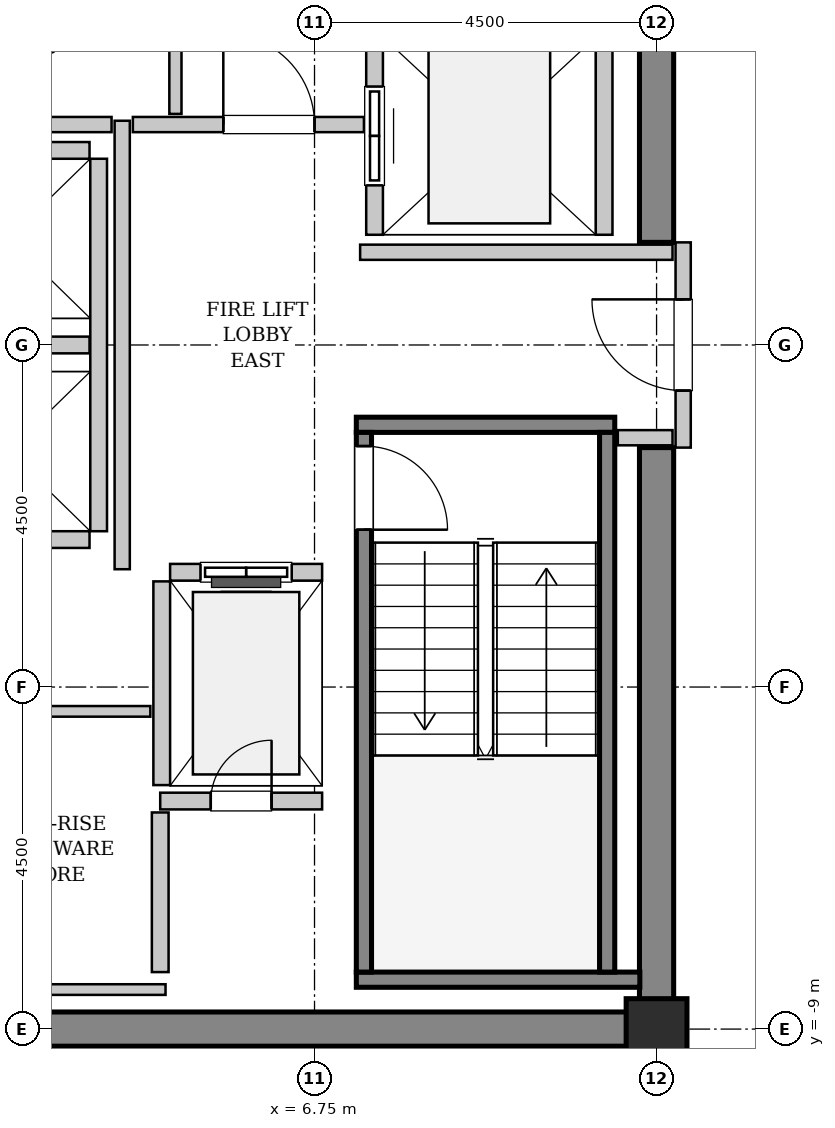
"""IFC4 building model, lengths in metres.
Left out: names, types, materials, properties, quantities, classifications, styles, units other than length and angle.
Written with IfcOpenShell. Run it as: python <this file> out.ifc"""

import sys

from ifc_helpers import new_model, si_unit, direction, frame, frame_2d, origin, origin_2d, place, context, subcontext, project, spatial, rectangle, hollow_rectangle, extrude, source, transform, mapped, element, fill, save


model = new_model("IFC4")
c1 = context("Model", 3, precision=1e-05, world=origin(), true_north=direction((0.0, 1.0)))
c2 = subcontext(c1, "Body", "Model", "MODEL_VIEW")
j1 = project(units=[si_unit("LENGTHUNIT", "METRE"), si_unit("PLANEANGLEUNIT", "RADIAN")], contexts=[c1])
p1 = place(None, origin())
s1 = spatial("IfcSite", under=j1, at=p1, CompositionType="ELEMENT")
p2 = place(p1, origin())
s2 = spatial("IfcBuilding", under=s1, at=p2, CompositionType="ELEMENT")
p3 = place(p2, frame((0.0, 0.0, 298.8)))
s3 = spatial("IfcBuildingStorey", under=s2, at=p3, CompositionType="ELEMENT", Elevation=298.8)
m1 = source(origin(), c2, "Body", "SweptSolid", [
    extrude(rectangle(XDim=9.925, YDim=0.45, at=frame_2d((4.962, 0.0))), origin(), (0.0, 0.0, 1.0), 3.8),
])
p4 = place(p3, frame((1.55, -9.0, 0.0), z_axis=(0.0, 0.0, 1.0), x_axis=(1.0, 0.0, 0.0)))
e1 = element("IfcWall", 1, at=p4, inside=s3, PredefinedType="SHEAR", context=c2, shape_type="MappedRepresentation", body=[
    mapped(m1, transform((0.0, 0.0, 0.0), x_axis=(1.0, 0.0, 0.0), y_axis=(0.0, 1.0, 0.0), z_axis=(0.0, 0.0, 1.0), scale=1.0)),
])
m2 = source(origin(), c2, "Body", "SweptSolid", [
    extrude(rectangle(XDim=7.425, YDim=0.45, at=frame_2d((3.712, 0.0))), origin(), (0.0, 0.0, 1.0), 3.8),
])
for number, where, z_axis, x_axis in (
    (2, (11.25, -8.775, 0.0), (0.0, 0.0, 1.0), (0.0, 1.0, 0.0)),
    (3, (11.25, 1.35, 0.0), (0.0, 0.0, 1.0), (0.0, 1.0, 0.0)),
):
    element("IfcWall", number, at=place(p3, frame(where, z_axis=z_axis, x_axis=x_axis)), inside=s3, PredefinedType="SHEAR", context=c2, shape_type="MappedRepresentation", body=[
        mapped(m2, transform((0.0, 0.0, 0.0), x_axis=(1.0, 0.0, 0.0), y_axis=(0.0, 1.0, 0.0), z_axis=(0.0, 0.0, 1.0), scale=1.0)),
    ])
m3 = source(origin(), c2, "Body", "SweptSolid", [
    extrude(hollow_rectangle(XDim=0.8, YDim=0.8, WallThickness=0.04, InnerFilletRadius=0.04, OuterFilletRadius=0.08, at=origin_2d()), origin(), (0.0, 0.0, 1.0), 3.8),
])
p5 = place(p3, frame((11.25, -9.0, 0.0), z_axis=(0.0, 0.0, 1.0), x_axis=(1.0, 0.0, 0.0)))
e4 = element("IfcColumn", 4, at=p5, inside=s3, PredefinedType="COLUMN", context=c2, shape_type="MappedRepresentation", body=[
    mapped(m3, transform((0.0, 0.0, 0.0), x_axis=(1.0, 0.0, 0.0), y_axis=(0.0, 1.0, 0.0), z_axis=(0.0, 0.0, 1.0), scale=1.0)),
])
m4 = source(origin(), c2, "Body", "SweptSolid", [
    extrude(rectangle(XDim=3.4, YDim=0.2, at=frame_2d((1.7, 0.0))), origin(), (0.0, 0.0, 1.0), 3.8),
])
p6 = place(p3, frame((7.3, -1.05, 0.0), z_axis=(0.0, 0.0, 1.0), x_axis=(1.0, 0.0, 0.0)))
e5 = element("IfcWall", 5, at=p6, inside=s3, PredefinedType="SOLIDWALL", context=c2, shape_type="MappedRepresentation", body=[
    mapped(m4, transform((0.0, 0.0, 0.0), x_axis=(1.0, 0.0, 0.0), y_axis=(0.0, 1.0, 0.0), z_axis=(0.0, 0.0, 1.0), scale=1.0)),
])
m5 = source(origin(), c2, "Body", "SweptSolid", [
    extrude(rectangle(XDim=3.73, YDim=0.2, at=frame_2d((1.865, 0.0))), origin(), (0.0, 0.0, 1.0), 3.8),
])
p7 = place(p3, frame((7.3, -8.35, 0.0), z_axis=(0.0, 0.0, 1.0), x_axis=(1.0, 0.0, 0.0)))
e6 = element("IfcWall", 6, at=p7, inside=s3, PredefinedType="SOLIDWALL", context=c2, shape_type="MappedRepresentation", body=[
    mapped(m5, transform((0.0, 0.0, 0.0), x_axis=(1.0, 0.0, 0.0), y_axis=(0.0, 1.0, 0.0), z_axis=(0.0, 0.0, 1.0), scale=1.0)),
])
m6 = source(origin(), c2, "Body", "SweptSolid", [
    extrude(rectangle(XDim=7.1, YDim=0.2, at=frame_2d((3.55, 0.0))), origin(), (0.0, 0.0, 1.0), 3.8),
])
p8 = place(p3, frame((7.4, -1.15, 0.0), z_axis=(0.0, 0.0, 1.0), x_axis=(0.0, -1.0, 0.0)))
e7 = element("IfcWall", 7, at=p8, inside=s3, PredefinedType="SOLIDWALL", context=c2, shape_type="MappedRepresentation", body=[
    mapped(m6, transform((0.0, 0.0, 0.0), x_axis=(1.0, 0.0, 0.0), y_axis=(0.0, 1.0, 0.0), z_axis=(0.0, 0.0, 1.0), scale=1.0)),
])
p9 = place(p8, frame((0.18, 0.0, 0.0)))
e8 = element("IfcOpeningElement", 8, at=p9, cuts=e7, PredefinedType="OPENING", context=c2, shape_type="SweptSolid", body=[
    extrude(rectangle(XDim=1.1, YDim=2.15, at=frame_2d((0.55, 1.075))), frame((0.0, 0.11, 0.0), z_axis=(0.0, -1.0, 0.0), x_axis=(1.0, 0.0, 0.0)), (0.0, 0.0, 1.0), 0.22),
])
p10 = place(p3, frame((10.6, -1.15, 0.0), z_axis=(0.0, 0.0, 1.0), x_axis=(0.0, -1.0, 0.0)))
e9 = element("IfcWall", 9, at=p10, inside=s3, PredefinedType="SOLIDWALL", context=c2, shape_type="MappedRepresentation", body=[
    mapped(m6, transform((0.0, 0.0, 0.0), x_axis=(1.0, 0.0, 0.0), y_axis=(0.0, 1.0, 0.0), z_axis=(0.0, 0.0, 1.0), scale=1.0)),
])
m7 = source(origin(), c2, "Body", "SweptSolid", [
    extrude(rectangle(XDim=2.0, YDim=0.22, at=frame_2d((1.0, 0.0))), origin(), (0.0, 0.0, 1.0), 3.535),
])
p11 = place(p3, frame((6.85, -2.99, 0.0), z_axis=(0.0, 0.0, 1.0), x_axis=(-1.0, 0.0, 0.0)))
e10 = element("IfcWall", 10, at=p11, inside=s3, PredefinedType="SOLIDWALL", context=c2, shape_type="MappedRepresentation", body=[
    mapped(m7, transform((0.0, 0.0, 0.0), x_axis=(1.0, 0.0, 0.0), y_axis=(0.0, 1.0, 0.0), z_axis=(0.0, 0.0, 1.0), scale=1.0)),
])
p12 = place(p11, frame((0.4, 0.0, 0.0)))
e11 = element("IfcOpeningElement", 11, at=p12, cuts=e10, PredefinedType="OPENING", context=c2, shape_type="SweptSolid", body=[
    extrude(rectangle(XDim=1.2, YDim=2.2, at=frame_2d((0.6, 1.1))), frame((0.0, 0.12, 0.0), z_axis=(0.0, -1.0, 0.0), x_axis=(1.0, 0.0, 0.0)), (0.0, 0.0, 1.0), 0.24),
])
m8 = source(origin(), c2, "Body", "SweptSolid", [
    extrude(rectangle(XDim=2.68, YDim=0.22, at=frame_2d((1.34, 0.0))), origin(), (0.0, 0.0, 1.0), 3.535),
])
p13 = place(p3, frame((4.74, -3.11, 0.0), z_axis=(0.0, 0.0, 1.0), x_axis=(0.0, -1.0, 0.0)))
e12 = element("IfcWall", 12, at=p13, inside=s3, PredefinedType="SOLIDWALL", context=c2, shape_type="MappedRepresentation", body=[
    mapped(m8, transform((0.0, 0.0, 0.0), x_axis=(1.0, 0.0, 0.0), y_axis=(0.0, 1.0, 0.0), z_axis=(0.0, 0.0, 1.0), scale=1.0)),
])
m9 = source(origin(), c2, "Body", "SweptSolid", [
    extrude(rectangle(XDim=5.45, YDim=0.22, at=frame_2d((2.725, 0.0))), origin(), (0.0, 0.0, 1.0), 3.535),
])
p14 = place(p3, frame((7.54, 6.9, 0.0), z_axis=(0.0, 0.0, 1.0), x_axis=(0.0, -1.0, 0.0)))
e13 = element("IfcWall", 13, at=p14, inside=s3, PredefinedType="SOLIDWALL", context=c2, shape_type="MappedRepresentation", body=[
    mapped(m9, transform((0.0, 0.0, 0.0), x_axis=(1.0, 0.0, 0.0), y_axis=(0.0, 1.0, 0.0), z_axis=(0.0, 0.0, 1.0), scale=1.0)),
])
p15 = place(p14, frame((3.5, 0.0, 0.0)))
e14 = element("IfcOpeningElement", 14, at=p15, cuts=e13, PredefinedType="OPENING", context=c2, shape_type="SweptSolid", body=[
    extrude(rectangle(XDim=1.3, YDim=2.3, at=frame_2d((0.65, 1.15))), frame((0.0, 0.12, 0.0), z_axis=(0.0, -1.0, 0.0), x_axis=(1.0, 0.0, 0.0)), (0.0, 0.0, 1.0), 0.24),
])
p16 = place(p14, frame((0.65, 0.0, 0.0)))
e15 = element("IfcOpeningElement", 15, at=p16, cuts=e13, PredefinedType="OPENING", context=c2, shape_type="SweptSolid", body=[
    extrude(rectangle(XDim=1.3, YDim=2.3, at=frame_2d((0.65, 1.15))), frame((0.0, 0.12, 0.0), z_axis=(0.0, -1.0, 0.0), x_axis=(1.0, 0.0, 0.0)), (0.0, 0.0, 1.0), 0.24),
])
p17 = place(p3, frame((10.56, 1.45, 0.0), z_axis=(0.0, 0.0, 1.0), x_axis=(0.0, 1.0, 0.0)))
e16 = element("IfcWall", 16, at=p17, inside=s3, PredefinedType="SOLIDWALL", context=c2, shape_type="MappedRepresentation", body=[
    mapped(m9, transform((0.0, 0.0, 0.0), x_axis=(1.0, 0.0, 0.0), y_axis=(0.0, 1.0, 0.0), z_axis=(0.0, 0.0, 1.0), scale=1.0)),
])
m10 = source(origin(), c2, "Body", "SweptSolid", [
    extrude(rectangle(XDim=4.9, YDim=0.22, at=frame_2d((2.45, 0.0))), origin(), (0.0, 0.0, 1.0), 3.535),
])
p18 = place(p3, frame((3.91, -2.45, 0.0), z_axis=(0.0, 0.0, 1.0), x_axis=(0.0, 1.0, 0.0)))
e17 = element("IfcWall", 17, at=p18, inside=s3, PredefinedType="SOLIDWALL", context=c2, shape_type="MappedRepresentation", body=[
    mapped(m10, transform((0.0, 0.0, 0.0), x_axis=(1.0, 0.0, 0.0), y_axis=(0.0, 1.0, 0.0), z_axis=(0.0, 0.0, 1.0), scale=1.0)),
])
m11 = source(origin(), c2, "Body", "SweptSolid", [
    extrude(rectangle(XDim=2.13, YDim=0.22, at=frame_2d((1.065, 0.0))), origin(), (0.0, 0.0, 1.0), 3.535),
])
for number, where, z_axis, x_axis in (
    (18, (1.66, -2.56, 0.0), (0.0, 0.0, 1.0), (1.0, 0.0, 0.0)),
    (19, (1.66, 0.0, 0.0), (0.0, 0.0, 1.0), (1.0, 0.0, 0.0)),
    (20, (3.79, 2.56, 0.0), (0.0, 0.0, 1.0), (-1.0, 0.0, 0.0)),
):
    element("IfcWall", number, at=place(p3, frame(where, z_axis=z_axis, x_axis=x_axis)), inside=s3, PredefinedType="SOLIDWALL", context=c2, shape_type="MappedRepresentation", body=[
        mapped(m11, transform((0.0, 0.0, 0.0), x_axis=(1.0, 0.0, 0.0), y_axis=(0.0, 1.0, 0.0), z_axis=(0.0, 0.0, 1.0), scale=1.0)),
    ])
p19 = place(p3, frame((4.72, -6.0, 0.0), z_axis=(0.0, 0.0, 1.0), x_axis=(1.0, 0.0, 0.0)))
e21 = element("IfcWall", 21, at=p19, inside=s3, PredefinedType="SOLIDWALL", context=c2, shape_type="MappedRepresentation", body=[
    mapped(m11, transform((0.0, 0.0, 0.0), x_axis=(1.0, 0.0, 0.0), y_axis=(0.0, 1.0, 0.0), z_axis=(0.0, 0.0, 1.0), scale=1.0)),
])
p20 = place(p19, frame((0.665, 0.0, 0.0)))
e22 = element("IfcOpeningElement", 22, at=p20, cuts=e21, PredefinedType="OPENING", context=c2, shape_type="SweptSolid", body=[
    extrude(rectangle(XDim=0.8, YDim=2.0, at=frame_2d((0.4, 1.0))), frame((0.0, 0.12, 0.0), z_axis=(0.0, -1.0, 0.0), x_axis=(1.0, 0.0, 0.0)), (0.0, 0.0, 1.0), 0.24),
])
m12 = source(origin(), c2, "Body", "SweptSolid", [
    extrude(rectangle(XDim=2.1, YDim=0.22, at=frame_2d((1.05, 0.0))), origin(), (0.0, 0.0, 1.0), 3.535),
])
p21 = place(p3, frame((4.72, -8.25, 0.0), z_axis=(0.0, 0.0, 1.0), x_axis=(0.0, 1.0, 0.0)))
e23 = element("IfcWall", 23, at=p21, inside=s3, PredefinedType="SOLIDWALL", context=c2, shape_type="MappedRepresentation", body=[
    mapped(m12, transform((0.0, 0.0, 0.0), x_axis=(1.0, 0.0, 0.0), y_axis=(0.0, 1.0, 0.0), z_axis=(0.0, 0.0, 1.0), scale=1.0)),
])
m13 = source(origin(), c2, "Body", "SweptSolid", [
    extrude(rectangle(XDim=2.7, YDim=0.2, at=frame_2d((1.35, 0.0))), origin(), (0.0, 0.0, 1.0), 2.625),
])
p22 = place(p3, frame((11.6, -1.35, 0.0), z_axis=(0.0, 0.0, 1.0), x_axis=(0.0, 1.0, 0.0)))
e24 = element("IfcWall", 24, at=p22, inside=s3, PredefinedType="PARTITIONING", context=c2, shape_type="MappedRepresentation", body=[
    mapped(m13, transform((0.0, 0.0, 0.0), x_axis=(1.0, 0.0, 0.0), y_axis=(0.0, 1.0, 0.0), z_axis=(0.0, 0.0, 1.0), scale=1.0)),
])
p23 = place(p22, frame((0.75, 0.0, 0.0)))
e25 = element("IfcOpeningElement", 25, at=p23, cuts=e24, PredefinedType="OPENING", context=c2, shape_type="SweptSolid", body=[
    extrude(rectangle(XDim=1.2, YDim=2.15, at=frame_2d((0.6, 1.075))), frame((0.0, 0.11, 0.0), z_axis=(0.0, -1.0, 0.0), x_axis=(1.0, 0.0, 0.0)), (0.0, 0.0, 1.0), 0.22),
])
m14 = source(origin(), c2, "Body", "SweptSolid", [
    extrude(rectangle(XDim=5.9, YDim=0.2, at=frame_2d((2.95, 0.0))), origin(), (0.0, 0.0, 1.0), 3.535),
])
p24 = place(p3, frame((4.22, -2.95, 0.0), z_axis=(0.0, 0.0, 1.0), x_axis=(0.0, 1.0, 0.0)))
e26 = element("IfcWall", 26, at=p24, inside=s3, PredefinedType="PARTITIONING", context=c2, shape_type="MappedRepresentation", body=[
    mapped(m14, transform((0.0, 0.0, 0.0), x_axis=(1.0, 0.0, 0.0), y_axis=(0.0, 1.0, 0.0), z_axis=(0.0, 0.0, 1.0), scale=1.0)),
])
m15 = source(origin(), c2, "Body", "SweptSolid", [
    extrude(rectangle(XDim=2.52, YDim=0.2, at=frame_2d((1.26, 0.0))), origin(), (0.0, 0.0, 1.0), 3.535),
])
p25 = place(p3, frame((1.56, 2.9, 0.0), z_axis=(0.0, 0.0, 1.0), x_axis=(1.0, 0.0, 0.0)))
e27 = element("IfcWall", 27, at=p25, inside=s3, PredefinedType="PARTITIONING", context=c2, shape_type="MappedRepresentation", body=[
    mapped(m15, transform((0.0, 0.0, 0.0), x_axis=(1.0, 0.0, 0.0), y_axis=(0.0, 1.0, 0.0), z_axis=(0.0, 0.0, 1.0), scale=1.0)),
])
m16 = source(origin(), c2, "Body", "SweptSolid", [
    extrude(rectangle(XDim=3.04, YDim=0.2, at=frame_2d((1.52, 0.0))), origin(), (0.0, 0.0, 1.0), 3.535),
])
p26 = place(p3, frame((4.36, 2.9, 0.0), z_axis=(0.0, 0.0, 1.0), x_axis=(1.0, 0.0, 0.0)))
e28 = element("IfcWall", 28, at=p26, inside=s3, PredefinedType="PARTITIONING", context=c2, shape_type="MappedRepresentation", body=[
    mapped(m16, transform((0.0, 0.0, 0.0), x_axis=(1.0, 0.0, 0.0), y_axis=(0.0, 1.0, 0.0), z_axis=(0.0, 0.0, 1.0), scale=1.0)),
])
p27 = place(p26, frame((1.19, 0.0, 0.0)))
e29 = element("IfcOpeningElement", 29, at=p27, cuts=e28, PredefinedType="OPENING", context=c2, shape_type="SweptSolid", body=[
    extrude(rectangle(XDim=1.2, YDim=2.15, at=frame_2d((0.6, 1.075))), frame((0.0, 0.11, 0.0), z_axis=(0.0, -1.0, 0.0), x_axis=(1.0, 0.0, 0.0)), (0.0, 0.0, 1.0), 0.22),
])
m17 = source(origin(), c2, "Body", "SweptSolid", [
    extrude(rectangle(XDim=4.11, YDim=0.2, at=frame_2d((2.055, 0.0))), origin(), (0.0, 0.0, 1.0), 3.535),
])
p28 = place(p3, frame((7.35, 1.22, 0.0), z_axis=(0.0, 0.0, 1.0), x_axis=(1.0, 0.0, 0.0)))
e30 = element("IfcWall", 30, at=p28, inside=s3, PredefinedType="PARTITIONING", context=c2, shape_type="MappedRepresentation", body=[
    mapped(m17, transform((0.0, 0.0, 0.0), x_axis=(1.0, 0.0, 0.0), y_axis=(0.0, 1.0, 0.0), z_axis=(0.0, 0.0, 1.0), scale=1.0)),
])
m18 = source(origin(), c2, "Body", "SweptSolid", [
    extrude(rectangle(XDim=0.72, YDim=0.2, at=frame_2d((0.36, 0.0))), origin(), (0.0, 0.0, 1.0), 3.535),
])
p29 = place(p3, frame((10.74, -1.22, 0.0), z_axis=(0.0, 0.0, 1.0), x_axis=(1.0, 0.0, 0.0)))
e31 = element("IfcWall", 31, at=p29, inside=s3, PredefinedType="PARTITIONING", context=c2, shape_type="MappedRepresentation", body=[
    mapped(m18, transform((0.0, 0.0, 0.0), x_axis=(1.0, 0.0, 0.0), y_axis=(0.0, 1.0, 0.0), z_axis=(0.0, 0.0, 1.0), scale=1.0)),
])
m19 = source(origin(), c2, "Body", "SweptSolid", [
    extrude(rectangle(XDim=5.45, YDim=0.16, at=frame_2d((2.725, 0.0))), origin(), (0.0, 0.0, 1.0), 3.535),
])
p30 = place(p3, frame((4.92, 3.04, 0.0), z_axis=(0.0, 0.0, 1.0), x_axis=(0.0, 1.0, 0.0)))
e32 = element("IfcWall", 32, at=p30, inside=s3, PredefinedType="PARTITIONING", context=c2, shape_type="MappedRepresentation", body=[
    mapped(m19, transform((0.0, 0.0, 0.0), x_axis=(1.0, 0.0, 0.0), y_axis=(0.0, 1.0, 0.0), z_axis=(0.0, 0.0, 1.0), scale=1.0)),
])
m20 = source(origin(), c2, "Body", "SweptSolid", [
    extrude(rectangle(XDim=2.95, YDim=0.14, at=frame_2d((1.475, 0.0))), origin(), (0.0, 0.0, 1.0), 3.535),
])
p31 = place(p3, frame((1.64, -4.82, 0.0), z_axis=(0.0, 0.0, 1.0), x_axis=(1.0, 0.0, 0.0)))
e33 = element("IfcWall", 33, at=p31, inside=s3, PredefinedType="PARTITIONING", context=c2, shape_type="MappedRepresentation", body=[
    mapped(m20, transform((0.0, 0.0, 0.0), x_axis=(1.0, 0.0, 0.0), y_axis=(0.0, 1.0, 0.0), z_axis=(0.0, 0.0, 1.0), scale=1.0)),
])
m21 = source(origin(), c2, "Body", "SweptSolid", [
    extrude(rectangle(XDim=3.15, YDim=0.14, at=frame_2d((1.575, 0.0))), origin(), (0.0, 0.0, 1.0), 3.535),
])
p32 = place(p3, frame((1.64, -8.48, 0.0), z_axis=(0.0, 0.0, 1.0), x_axis=(1.0, 0.0, 0.0)))
e34 = element("IfcWall", 34, at=p32, inside=s3, PredefinedType="PARTITIONING", context=c2, shape_type="MappedRepresentation", body=[
    mapped(m21, transform((0.0, 0.0, 0.0), x_axis=(1.0, 0.0, 0.0), y_axis=(0.0, 1.0, 0.0), z_axis=(0.0, 0.0, 1.0), scale=1.0)),
])
m22 = source(origin(), c2, "Body", "SweptSolid", [
    extrude(rectangle(XDim=1.1, YDim=2.15, at=frame_2d((0.55, 1.075))), frame((0.0, 0.025, 0.0), z_axis=(0.0, -1.0, 0.0), x_axis=(1.0, 0.0, 0.0)), (0.0, 0.0, 1.0), 0.05),
])
p33 = place(p9, origin())
e35 = element("IfcDoor", 35, at=p33, inside=s3, OperationType="SINGLE_SWING_RIGHT", PredefinedType="DOOR", context=c2, shape_type="MappedRepresentation", body=[
    mapped(m22, transform((0.0, 0.0, 0.0), x_axis=(1.0, 0.0, 0.0), y_axis=(0.0, 1.0, 0.0), z_axis=(0.0, 0.0, 1.0), scale=1.0)),
])
fill(e8, e35)
m23 = source(origin(), c2, "Body", "SweptSolid", [
    extrude(rectangle(XDim=1.2, YDim=2.2, at=frame_2d((0.6, 1.1))), frame((0.0, 0.025, 0.0), z_axis=(0.0, -1.0, 0.0), x_axis=(1.0, 0.0, 0.0)), (0.0, 0.0, 1.0), 0.05),
])
p34 = place(p12, origin())
e36 = element("IfcDoor", 36, at=p34, inside=s3, OperationType="SLIDING_TO_LEFT", PredefinedType="DOOR", context=c2, shape_type="MappedRepresentation", body=[
    mapped(m23, transform((0.0, 0.0, 0.0), x_axis=(1.0, 0.0, 0.0), y_axis=(0.0, 1.0, 0.0), z_axis=(0.0, 0.0, 1.0), scale=1.0)),
])
fill(e11, e36)
m24 = source(origin(), c2, "Body", "SweptSolid", [
    extrude(rectangle(XDim=1.3, YDim=2.3, at=frame_2d((0.65, 1.15))), frame((0.0, 0.025, 0.0), z_axis=(0.0, -1.0, 0.0), x_axis=(1.0, 0.0, 0.0)), (0.0, 0.0, 1.0), 0.05),
])
p35 = place(p15, origin())
e37 = element("IfcDoor", 37, at=p35, inside=s3, OperationType="SLIDING_TO_RIGHT", PredefinedType="DOOR", context=c2, shape_type="MappedRepresentation", body=[
    mapped(m24, transform((0.0, 0.0, 0.0), x_axis=(1.0, 0.0, 0.0), y_axis=(0.0, 1.0, 0.0), z_axis=(0.0, 0.0, 1.0), scale=1.0)),
])
fill(e14, e37)
m25 = source(origin(), c2, "Body", "SweptSolid", [
    extrude(rectangle(XDim=0.8, YDim=2.0, at=frame_2d((0.4, 1.0))), frame((0.0, 0.025, 0.0), z_axis=(0.0, -1.0, 0.0), x_axis=(1.0, 0.0, 0.0)), (0.0, 0.0, 1.0), 0.05),
])
p36 = place(p20, origin())
e38 = element("IfcDoor", 38, at=p36, inside=s3, OperationType="SINGLE_SWING_RIGHT", PredefinedType="TRAPDOOR", context=c2, shape_type="MappedRepresentation", body=[
    mapped(m25, transform((0.0, 0.0, 0.0), x_axis=(1.0, 0.0, 0.0), y_axis=(0.0, 1.0, 0.0), z_axis=(0.0, 0.0, 1.0), scale=1.0)),
])
fill(e22, e38)
m26 = source(origin(), c2, "Body", "SweptSolid", [
    extrude(rectangle(XDim=1.2, YDim=2.15, at=frame_2d((0.6, 1.075))), frame((0.0, 0.025, 0.0), z_axis=(0.0, -1.0, 0.0), x_axis=(1.0, 0.0, 0.0)), (0.0, 0.0, 1.0), 0.05),
])
p37 = place(p23, origin())
e39 = element("IfcDoor", 39, at=p37, inside=s3, OperationType="SINGLE_SWING_RIGHT", PredefinedType="DOOR", context=c2, shape_type="MappedRepresentation", body=[
    mapped(m26, transform((0.0, 0.0, 0.0), x_axis=(1.0, 0.0, 0.0), y_axis=(0.0, 1.0, 0.0), z_axis=(0.0, 0.0, 1.0), scale=1.0)),
])
fill(e25, e39)
p38 = place(p27, origin())
e40 = element("IfcDoor", 40, at=p38, inside=s3, OperationType="SINGLE_SWING_LEFT", PredefinedType="DOOR", context=c2, shape_type="MappedRepresentation", body=[
    mapped(m26, transform((0.0, 0.0, 0.0), x_axis=(1.0, 0.0, 0.0), y_axis=(0.0, 1.0, 0.0), z_axis=(0.0, 0.0, 1.0), scale=1.0)),
])
fill(e29, e40)
save(model, sys.argv[1])
